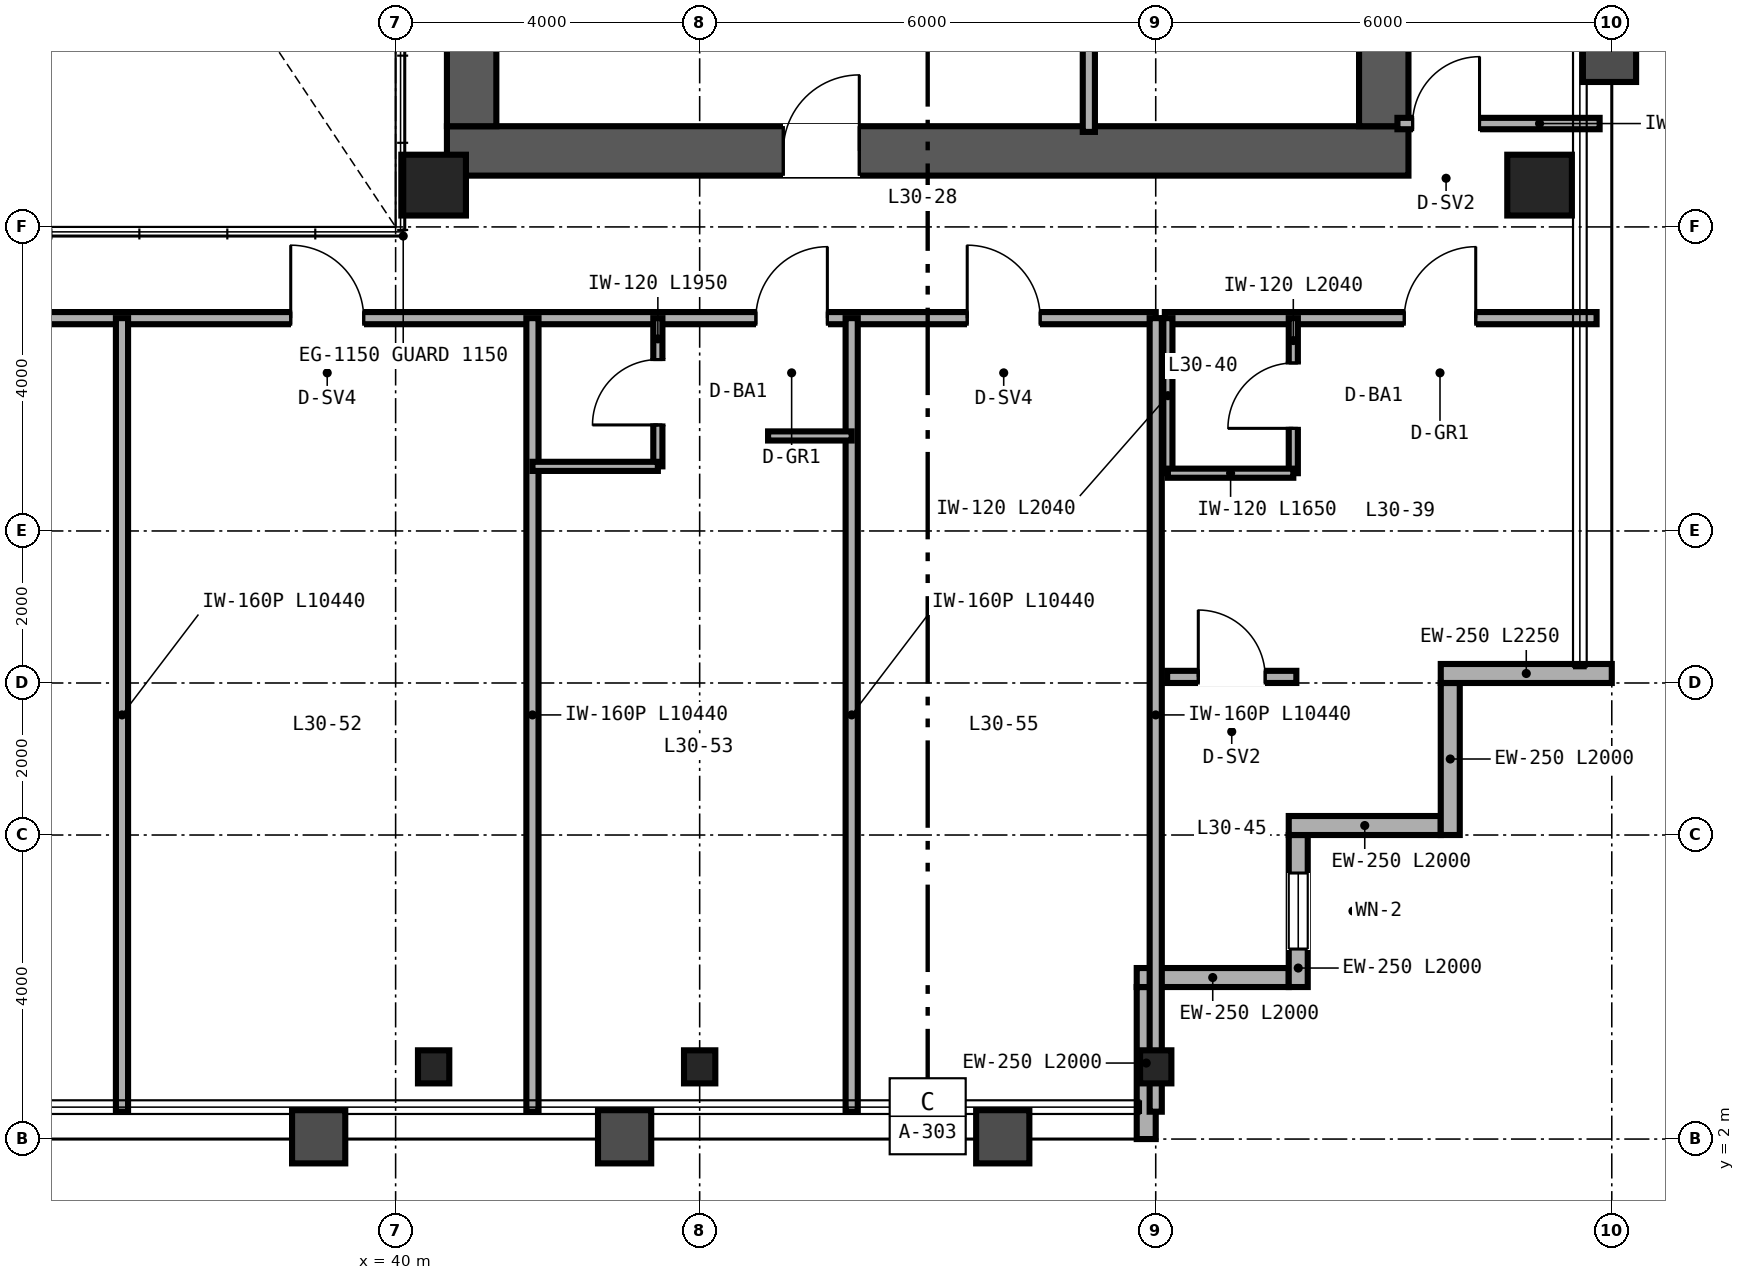
"""IFC4 building model, lengths in metres.
Left out: names, types, materials, properties, quantities, classifications, styles, units other than length and angle.
Written with IfcOpenShell. Run it as: python <this file> out.ifc"""

import sys

from ifc_helpers import new_model, si_unit, direction, frame, frame_2d, origin, origin_2d, place, context, subcontext, project, spatial, rectangle, hollow_rectangle, i_section, extrude, source, transform, mapped, element, fill, save


model = new_model("IFC4")
c1 = context("Model", 3, precision=1e-05, world=origin(), true_north=direction((0.0, 1.0)))
c2 = subcontext(c1, "Body", "Model", "MODEL_VIEW")
j1 = project(units=[si_unit("LENGTHUNIT", "METRE"), si_unit("PLANEANGLEUNIT", "RADIAN")], contexts=[c1])
p1 = place(None, origin())
s1 = spatial("IfcSite", under=j1, at=p1, CompositionType="ELEMENT")
p2 = place(p1, origin())
s2 = spatial("IfcBuilding", under=s1, at=p2, CompositionType="ELEMENT")
p3 = place(p2, frame((0.0, 0.0, 122.4)))
s3 = spatial("IfcBuildingStorey", under=s2, at=p3, CompositionType="ELEMENT", Elevation=122.4)
p4 = place(p3, frame((40.675, 15.0, 0.0), z_axis=(0.0, 0.0, 1.0), x_axis=(1.0, 0.0, 0.0)))
e1 = element("IfcWall", 1, at=p4, inside=s3, PredefinedType="SHEAR", context=c2, shape_type="SweptSolid", body=[
    extrude(rectangle(XDim=12.65, YDim=0.65, at=frame_2d((6.325, 0.0))), origin(), (0.0, 0.0, 1.0), 3.36),
])
p5 = place(p4, frame((4.425, 0.0, 0.0)))
e2 = element("IfcOpeningElement", 2, at=p5, cuts=e1, PredefinedType="OPENING", context=c2, shape_type="SweptSolid", body=[
    extrude(rectangle(XDim=1.0, YDim=2.15, at=frame_2d((0.5, 1.075))), frame((0.0, 0.335, 0.0), z_axis=(0.0, -1.0, 0.0), x_axis=(1.0, 0.0, 0.0)), (0.0, 0.0, 1.0), 0.67),
])
for number, where, z_axis, x_axis in (
    (3, (41.0, 15.325, 0.0), (0.0, 0.0, 1.0), (0.0, 1.0, 0.0)),
    (4, (53.0, 15.325, 0.0), (0.0, 0.0, 1.0), (0.0, 1.0, 0.0)),
):
    element("IfcWall", number, at=place(p3, frame(where, z_axis=z_axis, x_axis=x_axis)), inside=s3, PredefinedType="SHEAR", context=c2, shape_type="SweptSolid", body=[
        extrude(rectangle(XDim=21.35, YDim=0.65, at=frame_2d((10.675, 0.0))), origin(), (0.0, 0.0, 1.0), 3.36),
    ])
m1 = source(origin(), c2, "Body", "SweptSolid", [
    extrude(hollow_rectangle(XDim=0.85, YDim=0.8, WallThickness=0.032, at=origin_2d()), origin(), (0.0, 0.0, 1.0), 3.36),
])
for number, where, z_axis, x_axis in (
    (5, (40.5, 14.55, 0.0), (0.0, 0.0, 1.0), (1.0, 0.0, 0.0)),
    (6, (55.05, 14.55, 0.0), (0.0, 0.0, 1.0), (1.0, 0.0, 0.0)),
):
    element("IfcColumn", number, at=place(p3, frame(where, z_axis=z_axis, x_axis=x_axis)), inside=s3, PredefinedType="COLUMN", context=c2, shape_type="MappedRepresentation", body=[
        mapped(m1, transform((0.0, 0.0, 0.0), scale=1.0)),
    ])
m2 = source(origin(), c2, "Body", "SweptSolid", [
    extrude(i_section(OverallWidth=0.412, OverallDepth=0.435, WebThickness=0.036, FlangeThickness=0.057, FilletRadius=0.025, at=origin_2d()), origin(), (0.0, 0.0, 1.0), 3.36),
])
for number, where, z_axis, x_axis in (
    (7, (40.5, 2.95, 0.0), (0.0, 0.0, 1.0), (1.0, 0.0, 0.0)),
    (8, (44.0, 2.95, 0.0), (0.0, 0.0, 1.0), (1.0, 0.0, 0.0)),
    (9, (50.0, 2.95, 0.0), (0.0, 0.0, 1.0), (1.0, 0.0, 0.0)),
):
    element("IfcColumn", number, at=place(p3, frame(where, z_axis=z_axis, x_axis=x_axis)), inside=s3, PredefinedType="COLUMN", context=c2, shape_type="MappedRepresentation", body=[
        mapped(m2, transform((0.0, 0.0, 0.0), scale=1.0)),
    ])
p6 = place(p3, frame((49.875, 2.0, 0.0), z_axis=(0.0, 0.0, 1.0), x_axis=(0.0, 1.0, 0.0)))
e10 = element("IfcWall", 10, at=p6, inside=s3, PredefinedType="SOLIDWALL", context=c2, shape_type="SweptSolid", body=[
    extrude(rectangle(XDim=2.0, YDim=0.25, at=frame_2d((1.0, 0.0))), origin(), (0.0, 0.0, 1.0), 2.667),
])
p7 = place(p3, frame((49.75, 4.125, 0.0), z_axis=(0.0, 0.0, 1.0), x_axis=(1.0, 0.0, 0.0)))
e11 = element("IfcWall", 11, at=p7, inside=s3, PredefinedType="SOLIDWALL", context=c2, shape_type="SweptSolid", body=[
    extrude(rectangle(XDim=2.0, YDim=0.25, at=frame_2d((1.0, 0.0))), origin(), (0.0, 0.0, 1.0), 3.36),
])
p8 = place(p3, frame((51.875, 4.0, 0.0), z_axis=(0.0, 0.0, 1.0), x_axis=(0.0, 1.0, 0.0)))
e12 = element("IfcWall", 12, at=p8, inside=s3, PredefinedType="SOLIDWALL", context=c2, shape_type="SweptSolid", body=[
    extrude(rectangle(XDim=2.0, YDim=0.25, at=frame_2d((1.0, 0.0))), origin(), (0.0, 0.0, 1.0), 3.36),
])
p9 = place(p8, frame((0.5, 0.0, 0.85)))
e13 = element("IfcOpeningElement", 13, at=p9, cuts=e12, PredefinedType="OPENING", context=c2, shape_type="SweptSolid", body=[
    extrude(rectangle(XDim=1.0, YDim=1.9, at=frame_2d((0.5, 0.95))), frame((0.0, 0.135, 0.0), z_axis=(0.0, -1.0, 0.0), x_axis=(1.0, 0.0, 0.0)), (0.0, 0.0, 1.0), 0.27),
])
for number, where, z_axis, x_axis in (
    (14, (51.75, 6.125, 0.0), (0.0, 0.0, 1.0), (1.0, 0.0, 0.0)),
    (15, (53.875, 6.0, 0.0), (0.0, 0.0, 1.0), (0.0, 1.0, 0.0)),
):
    element("IfcWall", number, at=place(p3, frame(where, z_axis=z_axis, x_axis=x_axis)), inside=s3, PredefinedType="SOLIDWALL", context=c2, shape_type="SweptSolid", body=[
        extrude(rectangle(XDim=2.0, YDim=0.25, at=frame_2d((1.0, 0.0))), origin(), (0.0, 0.0, 1.0), 3.36),
    ])
p10 = place(p3, frame((53.75, 8.125, 0.0), z_axis=(0.0, 0.0, 1.0), x_axis=(1.0, 0.0, 0.0)))
e16 = element("IfcWall", 16, at=p10, inside=s3, PredefinedType="SOLIDWALL", context=c2, shape_type="SweptSolid", body=[
    extrude(rectangle(XDim=2.25, YDim=0.25, at=frame_2d((1.125, 0.0))), origin(), (0.0, 0.0, 1.0), 3.36),
])
p11 = place(p3, frame((49.12, 15.25, 0.0), z_axis=(0.0, 0.0, 1.0), x_axis=(0.0, 1.0, 0.0)))
e17 = element("IfcWall", 17, at=p11, inside=s3, PredefinedType="PARTITIONING", context=c2, shape_type="SweptSolid", body=[
    extrude(rectangle(XDim=16.13, YDim=0.16, at=frame_2d((8.065, 0.0))), origin(), (0.0, 0.0, 1.0), 2.36),
])
p12 = place(p11, frame((3.8, 0.0, 0.0)))
e18 = element("IfcOpeningElement", 18, at=p12, cuts=e17, PredefinedType="OPENING", context=c2, shape_type="SweptSolid", body=[
    extrude(rectangle(XDim=0.92, YDim=2.15, at=frame_2d((0.46, 1.075))), frame((0.0, 0.09, 0.0), z_axis=(0.0, -1.0, 0.0), x_axis=(1.0, 0.0, 0.0)), (0.0, 0.0, 1.0), 0.18),
])
p13 = place(p11, frame((11.8, 0.0, 0.0)))
e19 = element("IfcOpeningElement", 19, at=p13, cuts=e17, PredefinedType="OPENING", context=c2, shape_type="SweptSolid", body=[
    extrude(rectangle(XDim=0.9, YDim=2.15, at=frame_2d((0.45, 1.075))), frame((0.0, 0.09, 0.0), z_axis=(0.0, -1.0, 0.0), x_axis=(1.0, 0.0, 0.0)), (0.0, 0.0, 1.0), 0.18),
])
p14 = place(p3, frame((53.18, 15.36, 0.0), z_axis=(0.0, 0.0, 1.0), x_axis=(1.0, 0.0, 0.0)))
e20 = element("IfcWall", 20, at=p14, inside=s3, PredefinedType="PARTITIONING", context=c2, shape_type="SweptSolid", body=[
    extrude(rectangle(XDim=2.66, YDim=0.15, at=frame_2d((1.33, 0.0))), origin(), (0.0, 0.0, 1.0), 2.581),
])
p15 = place(p14, frame((0.2, 0.0, 0.0)))
e21 = element("IfcOpeningElement", 21, at=p15, cuts=e20, PredefinedType="OPENING", context=c2, shape_type="SweptSolid", body=[
    extrude(rectangle(XDim=0.88, YDim=2.15, at=frame_2d((0.44, 1.075))), frame((0.0, 0.085, 0.0), z_axis=(0.0, -1.0, 0.0), x_axis=(1.0, 0.0, 0.0)), (0.0, 0.0, 1.0), 0.17),
])
p16 = place(p3, frame((50.12, 12.8, 0.0), z_axis=(0.0, 0.0, 1.0), x_axis=(1.0, 0.0, 0.0)))
e22 = element("IfcWall", 22, at=p16, inside=s3, PredefinedType="PARTITIONING", context=c2, shape_type="SweptSolid", body=[
    extrude(rectangle(XDim=5.68, YDim=0.16, at=frame_2d((2.84, 0.0))), origin(), (0.0, 0.0, 1.0), 3.36),
])
p17 = place(p16, frame((3.15, 0.0, 0.0)))
e23 = element("IfcOpeningElement", 23, at=p17, cuts=e22, PredefinedType="OPENING", context=c2, shape_type="SweptSolid", body=[
    extrude(rectangle(XDim=0.94, YDim=2.15, at=frame_2d((0.47, 1.075))), frame((0.0, 0.09, 0.0), z_axis=(0.0, -1.0, 0.0), x_axis=(1.0, 0.0, 0.0)), (0.0, 0.0, 1.0), 0.18),
])
p18 = place(p3, frame((51.81, 10.76, 0.0), z_axis=(0.0, 0.0, 1.0), x_axis=(0.0, 1.0, 0.0)))
e24 = element("IfcWall", 24, at=p18, inside=s3, PredefinedType="PARTITIONING", context=c2, shape_type="SweptSolid", body=[
    extrude(rectangle(XDim=2.04, YDim=0.12, at=frame_2d((1.02, 0.0))), origin(), (0.0, 0.0, 1.0), 3.36),
])
p19 = place(p18, frame((0.59, 0.0, 0.0)))
e25 = element("IfcOpeningElement", 25, at=p19, cuts=e24, PredefinedType="OPENING", context=c2, shape_type="SweptSolid", body=[
    extrude(rectangle(XDim=0.86, YDim=2.1, at=frame_2d((0.43, 1.05))), frame((0.0, 0.07, 0.0), z_axis=(0.0, -1.0, 0.0), x_axis=(1.0, 0.0, 0.0)), (0.0, 0.0, 1.0), 0.14),
])
p20 = place(p3, frame((50.16, 10.76, 0.0), z_axis=(0.0, 0.0, 1.0), x_axis=(0.0, 1.0, 0.0)))
e26 = element("IfcWall", 26, at=p20, inside=s3, PredefinedType="PARTITIONING", context=c2, shape_type="SweptSolid", body=[
    extrude(rectangle(XDim=2.04, YDim=0.12, at=frame_2d((1.02, 0.0))), origin(), (0.0, 0.0, 1.0), 3.36),
])
p21 = place(p3, frame((50.16, 10.76, 0.0), z_axis=(0.0, 0.0, 1.0), x_axis=(1.0, 0.0, 0.0)))
e27 = element("IfcWall", 27, at=p21, inside=s3, PredefinedType="PARTITIONING", context=c2, shape_type="SweptSolid", body=[
    extrude(rectangle(XDim=1.65, YDim=0.12, at=frame_2d((0.825, 0.0))), origin(), (0.0, 0.0, 1.0), 3.36),
])
p22 = place(p3, frame((50.15, 8.08, 0.0), z_axis=(0.0, 0.0, 1.0), x_axis=(1.0, 0.0, 0.0)))
e28 = element("IfcWall", 28, at=p22, inside=s3, PredefinedType="PARTITIONING", context=c2, shape_type="SweptSolid", body=[
    extrude(rectangle(XDim=1.7, YDim=0.16, at=frame_2d((0.85, 0.0))), origin(), (0.0, 0.0, 1.0), 3.36),
])
p23 = place(p22, frame((0.41, 0.0, 0.0)))
e29 = element("IfcOpeningElement", 29, at=p23, cuts=e28, PredefinedType="OPENING", context=c2, shape_type="SweptSolid", body=[
    extrude(rectangle(XDim=0.88, YDim=2.15, at=frame_2d((0.44, 1.075))), frame((0.0, 0.09, 0.0), z_axis=(0.0, -1.0, 0.0), x_axis=(1.0, 0.0, 0.0)), (0.0, 0.0, 1.0), 0.18),
])
p24 = place(p3, frame((14.0, 12.8, 0.0), z_axis=(0.0, 0.0, 1.0), x_axis=(1.0, 0.0, 0.0)))
e30 = element("IfcWall", 30, at=p24, inside=s3, PredefinedType="PARTITIONING", context=c2, shape_type="SweptSolid", body=[
    extrude(rectangle(XDim=36.0, YDim=0.16, at=frame_2d((18.0, 0.0))), origin(), (0.0, 0.0, 1.0), 2.581),
])
p25 = place(p24, frame((4.14, 0.0, 0.0)))
e31 = element("IfcOpeningElement", 31, at=p25, cuts=e30, PredefinedType="OPENING", context=c2, shape_type="SweptSolid", body=[
    extrude(rectangle(XDim=0.94, YDim=2.15, at=frame_2d((0.47, 1.075))), frame((0.0, 0.09, 0.0), z_axis=(0.0, -1.0, 0.0), x_axis=(1.0, 0.0, 0.0)), (0.0, 0.0, 1.0), 0.18),
])
p26 = place(p24, frame((9.54, 0.0, 0.0)))
e32 = element("IfcOpeningElement", 32, at=p26, cuts=e30, PredefinedType="OPENING", context=c2, shape_type="SweptSolid", body=[
    extrude(rectangle(XDim=0.94, YDim=2.15, at=frame_2d((0.47, 1.075))), frame((0.0, 0.09, 0.0), z_axis=(0.0, -1.0, 0.0), x_axis=(1.0, 0.0, 0.0)), (0.0, 0.0, 1.0), 0.18),
])
p27 = place(p24, frame((13.22, 0.0, 0.0)))
e33 = element("IfcOpeningElement", 33, at=p27, cuts=e30, PredefinedType="OPENING", context=c2, shape_type="SweptSolid", body=[
    extrude(rectangle(XDim=0.96, YDim=2.15, at=frame_2d((0.48, 1.075))), frame((0.0, 0.09, 0.0), z_axis=(0.0, -1.0, 0.0), x_axis=(1.0, 0.0, 0.0)), (0.0, 0.0, 1.0), 0.18),
])
p28 = place(p24, frame((19.02, 0.0, 0.0)))
e34 = element("IfcOpeningElement", 34, at=p28, cuts=e30, PredefinedType="OPENING", context=c2, shape_type="SweptSolid", body=[
    extrude(rectangle(XDim=0.96, YDim=2.15, at=frame_2d((0.48, 1.075))), frame((0.0, 0.09, 0.0), z_axis=(0.0, -1.0, 0.0), x_axis=(1.0, 0.0, 0.0)), (0.0, 0.0, 1.0), 0.18),
])
p29 = place(p24, frame((24.62, 0.0, 0.0)))
e35 = element("IfcOpeningElement", 35, at=p29, cuts=e30, PredefinedType="OPENING", context=c2, shape_type="SweptSolid", body=[
    extrude(rectangle(XDim=0.96, YDim=2.15, at=frame_2d((0.48, 1.075))), frame((0.0, 0.09, 0.0), z_axis=(0.0, -1.0, 0.0), x_axis=(1.0, 0.0, 0.0)), (0.0, 0.0, 1.0), 0.18),
])
p30 = place(p24, frame((30.74, 0.0, 0.0)))
e36 = element("IfcOpeningElement", 36, at=p30, cuts=e30, PredefinedType="OPENING", context=c2, shape_type="SweptSolid", body=[
    extrude(rectangle(XDim=0.94, YDim=2.15, at=frame_2d((0.47, 1.075))), frame((0.0, 0.09, 0.0), z_axis=(0.0, -1.0, 0.0), x_axis=(1.0, 0.0, 0.0)), (0.0, 0.0, 1.0), 0.18),
])
p31 = place(p24, frame((33.52, 0.0, 0.0)))
e37 = element("IfcOpeningElement", 37, at=p31, cuts=e30, PredefinedType="OPENING", context=c2, shape_type="SweptSolid", body=[
    extrude(rectangle(XDim=0.96, YDim=2.15, at=frame_2d((0.48, 1.075))), frame((0.0, 0.09, 0.0), z_axis=(0.0, -1.0, 0.0), x_axis=(1.0, 0.0, 0.0)), (0.0, 0.0, 1.0), 0.18),
])
p32 = place(p3, frame((50.0, 2.36, 0.0), z_axis=(0.0, 0.0, 1.0), x_axis=(0.0, 1.0, 0.0)))
e38 = element("IfcWall", 38, at=p32, inside=s3, PredefinedType="PARTITIONING", context=c2, shape_type="SweptSolid", body=[
    extrude(rectangle(XDim=10.44, YDim=0.16, at=frame_2d((5.22, 0.0))), origin(), (0.0, 0.0, 1.0), 2.667),
])
p33 = place(p3, frame((36.4, 2.36, 0.0), z_axis=(0.0, 0.0, 1.0), x_axis=(0.0, 1.0, 0.0)))
e39 = element("IfcWall", 39, at=p33, inside=s3, PredefinedType="PARTITIONING", context=c2, shape_type="SweptSolid", body=[
    extrude(rectangle(XDim=10.44, YDim=0.16, at=frame_2d((5.22, 0.0))), origin(), (0.0, 0.0, 1.0), 2.433),
])
p34 = place(p3, frame((41.8, 2.36, 0.0), z_axis=(0.0, 0.0, 1.0), x_axis=(0.0, 1.0, 0.0)))
e40 = element("IfcWall", 40, at=p34, inside=s3, PredefinedType="PARTITIONING", context=c2, shape_type="SweptSolid", body=[
    extrude(rectangle(XDim=10.44, YDim=0.16, at=frame_2d((5.22, 0.0))), origin(), (0.0, 0.0, 1.0), 2.823),
])
p35 = place(p3, frame((46.0, 2.36, 0.0), z_axis=(0.0, 0.0, 1.0), x_axis=(0.0, 1.0, 0.0)))
e41 = element("IfcWall", 41, at=p35, inside=s3, PredefinedType="PARTITIONING", context=c2, shape_type="SweptSolid", body=[
    extrude(rectangle(XDim=10.44, YDim=0.16, at=frame_2d((5.22, 0.0))), origin(), (0.0, 0.0, 1.0), 2.667),
])
p36 = place(p3, frame((43.45, 10.85, 0.0), z_axis=(0.0, 0.0, 1.0), x_axis=(0.0, 1.0, 0.0)))
e42 = element("IfcWall", 42, at=p36, inside=s3, PredefinedType="PARTITIONING", context=c2, shape_type="SweptSolid", body=[
    extrude(rectangle(XDim=1.95, YDim=0.12, at=frame_2d((0.975, 0.0))), origin(), (0.0, 0.0, 1.0), 3.36),
])
p37 = place(p36, frame((0.545, 0.0, 0.0)))
e43 = element("IfcOpeningElement", 43, at=p37, cuts=e42, PredefinedType="OPENING", context=c2, shape_type="SweptSolid", body=[
    extrude(rectangle(XDim=0.86, YDim=2.1, at=frame_2d((0.43, 1.05))), frame((0.0, 0.07, 0.0), z_axis=(0.0, -1.0, 0.0), x_axis=(1.0, 0.0, 0.0)), (0.0, 0.0, 1.0), 0.14),
])
p38 = place(p3, frame((41.8, 10.85, 0.0), z_axis=(0.0, 0.0, 1.0), x_axis=(1.0, 0.0, 0.0)))
e44 = element("IfcWall", 44, at=p38, inside=s3, PredefinedType="PARTITIONING", context=c2, shape_type="SweptSolid", body=[
    extrude(rectangle(XDim=1.65, YDim=0.12, at=frame_2d((0.825, 0.0))), origin(), (0.0, 0.0, 1.0), 3.36),
])
p39 = place(p3, frame((44.9, 11.25, 0.0), z_axis=(0.0, 0.0, 1.0), x_axis=(1.0, 0.0, 0.0)))
e45 = element("IfcWall", 45, at=p39, inside=s3, PredefinedType="PARTITIONING", context=c2, shape_type="SweptSolid", body=[
    extrude(rectangle(XDim=1.1, YDim=0.12, at=frame_2d((0.55, 0.0))), origin(), (0.0, 0.0, 1.0), 3.36),
])
m3 = source(origin(), c2, "Body", "SweptSolid", [
    extrude(rectangle(XDim=1.0, YDim=1.9, at=frame_2d((0.5, 0.95))), frame((0.0, 0.03, 0.0), z_axis=(0.0, -1.0, 0.0), x_axis=(1.0, 0.0, 0.0)), (0.0, 0.0, 1.0), 0.06),
])
p40 = place(p9, origin())
e46 = element("IfcWindow", 46, at=p40, inside=s3, PartitioningType="SINGLE_PANEL", PredefinedType="WINDOW", context=c2, shape_type="MappedRepresentation", body=[
    mapped(m3, transform((0.0, 0.0, 0.0), scale=1.0)),
])
fill(e13, e46)
m4 = source(origin(), c2, "Body", "SweptSolid", [
    extrude(rectangle(XDim=1.0, YDim=2.15, at=frame_2d((0.5, 1.075))), frame((0.0, 0.025, 0.0), z_axis=(0.0, -1.0, 0.0), x_axis=(1.0, 0.0, 0.0)), (0.0, 0.0, 1.0), 0.05),
])
p41 = place(p5, origin())
e47 = element("IfcDoor", 47, at=p41, inside=s3, OperationType="SINGLE_SWING_RIGHT", PredefinedType="DOOR", context=c2, shape_type="MappedRepresentation", body=[
    mapped(m4, transform((0.0, 0.0, 0.0), scale=1.0)),
])
fill(e2, e47)
m5 = source(origin(), c2, "Body", "SweptSolid", [
    extrude(rectangle(XDim=0.88, YDim=2.15, at=frame_2d((0.44, 1.075))), frame((0.0, 0.025, 0.0), z_axis=(0.0, -1.0, 0.0), x_axis=(1.0, 0.0, 0.0)), (0.0, 0.0, 1.0), 0.05),
])
p42 = place(p15, origin())
e48 = element("IfcDoor", 48, at=p42, inside=s3, OperationType="SINGLE_SWING_RIGHT", PredefinedType="DOOR", context=c2, shape_type="MappedRepresentation", body=[
    mapped(m5, transform((0.0, 0.0, 0.0), scale=1.0)),
])
fill(e21, e48)
m6 = source(origin(), c2, "Body", "SweptSolid", [
    extrude(rectangle(XDim=0.86, YDim=2.1, at=frame_2d((0.43, 1.05))), frame((0.0, 0.025, 0.0), z_axis=(0.0, -1.0, 0.0), x_axis=(1.0, 0.0, 0.0)), (0.0, 0.0, 1.0), 0.05),
])
p43 = place(p19, origin())
e49 = element("IfcDoor", 49, at=p43, inside=s3, OperationType="SINGLE_SWING_LEFT", PredefinedType="DOOR", context=c2, shape_type="MappedRepresentation", body=[
    mapped(m6, transform((0.0, 0.0, 0.0), scale=1.0)),
])
fill(e25, e49)
m7 = source(origin(), c2, "Body", "SweptSolid", [
    extrude(rectangle(XDim=0.94, YDim=2.15, at=frame_2d((0.47, 1.075))), frame((0.0, 0.025, 0.0), z_axis=(0.0, -1.0, 0.0), x_axis=(1.0, 0.0, 0.0)), (0.0, 0.0, 1.0), 0.05),
])
p44 = place(p17, origin())
e50 = element("IfcDoor", 50, at=p44, inside=s3, OperationType="SINGLE_SWING_RIGHT", PredefinedType="DOOR", context=c2, shape_type="MappedRepresentation", body=[
    mapped(m7, transform((0.0, 0.0, 0.0), scale=1.0)),
])
fill(e23, e50)
p45 = place(p23, origin())
e51 = element("IfcDoor", 51, at=p45, inside=s3, OperationType="SINGLE_SWING_LEFT", PredefinedType="DOOR", context=c2, shape_type="MappedRepresentation", body=[
    mapped(m5, transform((0.0, 0.0, 0.0), scale=1.0)),
])
fill(e29, e51)
p46 = place(p37, origin())
e52 = element("IfcDoor", 52, at=p46, inside=s3, OperationType="SINGLE_SWING_LEFT", PredefinedType="DOOR", context=c2, shape_type="MappedRepresentation", body=[
    mapped(m6, transform((0.0, 0.0, 0.0), scale=1.0)),
])
fill(e43, e52)
m8 = source(origin(), c2, "Body", "SweptSolid", [
    extrude(rectangle(XDim=0.96, YDim=2.15, at=frame_2d((0.48, 1.075))), frame((0.0, 0.025, 0.0), z_axis=(0.0, -1.0, 0.0), x_axis=(1.0, 0.0, 0.0)), (0.0, 0.0, 1.0), 0.05),
])
p47 = place(p29, origin())
e53 = element("IfcDoor", 53, at=p47, inside=s3, OperationType="SINGLE_SWING_LEFT", PredefinedType="DOOR", context=c2, shape_type="MappedRepresentation", body=[
    mapped(m8, transform((0.0, 0.0, 0.0), scale=1.0)),
])
fill(e35, e53)
p48 = place(p30, origin())
e54 = element("IfcDoor", 54, at=p48, inside=s3, OperationType="SINGLE_SWING_RIGHT", PredefinedType="DOOR", context=c2, shape_type="MappedRepresentation", body=[
    mapped(m7, transform((0.0, 0.0, 0.0), scale=1.0)),
])
fill(e36, e54)
p49 = place(p31, origin())
e55 = element("IfcDoor", 55, at=p49, inside=s3, OperationType="SINGLE_SWING_LEFT", PredefinedType="DOOR", context=c2, shape_type="MappedRepresentation", body=[
    mapped(m8, transform((0.0, 0.0, 0.0), scale=1.0)),
])
fill(e37, e55)
save(model, sys.argv[1])
